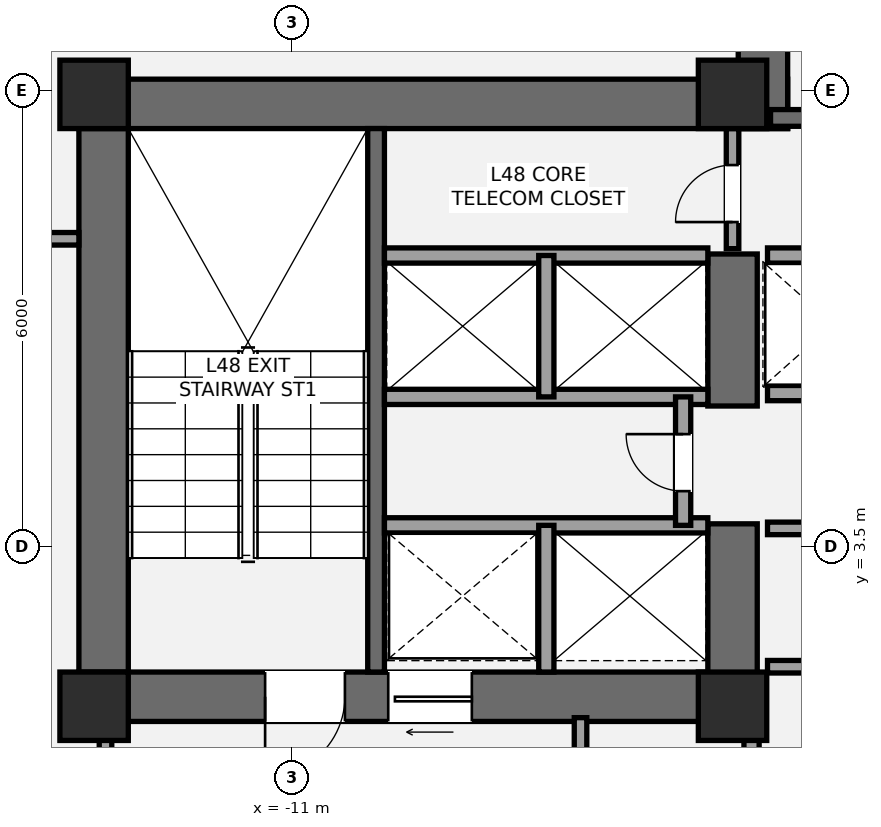
"""IFC4 building model, lengths in metres.
Left out: names, types, materials, properties, quantities, classifications, styles, units other than length and angle.
Written with IfcOpenShell. Run it as: python <this file> out.ifc"""

import sys

from ifc_helpers import new_model, si_unit, direction, frame, frame_2d, origin, origin_2d, place, context, subcontext, project, spatial, rectangle, extrude, element, fill, save


model = new_model("IFC4")
c1 = context("Model", 3, precision=1e-05, world=origin(), true_north=direction((0.0, 1.0)))
c2 = subcontext(c1, "Body", "Model", "MODEL_VIEW")
j1 = project(units=[si_unit("LENGTHUNIT", "METRE"), si_unit("PLANEANGLEUNIT", "RADIAN")], contexts=[c1])
p1 = place(None, origin())
s1 = spatial("IfcSite", under=j1, at=p1, CompositionType="ELEMENT")
p2 = place(p1, origin())
s2 = spatial("IfcBuilding", under=s1, at=p2, CompositionType="ELEMENT")
p3 = place(p2, frame((0.0, 0.0, 175.8)))
s3 = spatial("IfcBuildingStorey", under=s2, at=p3, CompositionType="ELEMENT", Elevation=175.8)
p4 = place(p3, frame((-13.475, 1.2, 0.0), z_axis=(0.0, 0.0, 1.0), x_axis=(0.0, 1.0, 0.0)))
e1 = element("IfcWall", 1, at=p4, inside=s3, PredefinedType="SHEAR", context=c2, shape_type="SweptSolid", body=[
    extrude(rectangle(XDim=8.45, YDim=0.65, at=frame_2d((4.225, 0.0))), origin(), (0.0, 0.0, 1.0), 3.2),
])
p5 = place(p3, frame((-13.8, 9.325, 0.0), z_axis=(0.0, 0.0, 1.0), x_axis=(1.0, 0.0, 0.0)))
e2 = element("IfcWall", 2, at=p5, inside=s3, PredefinedType="SHEAR", context=c2, shape_type="SweptSolid", body=[
    extrude(rectangle(XDim=9.325, YDim=0.65, at=frame_2d((4.663, 0.0))), origin(), (0.0, 0.0, 1.0), 3.2),
])
p6 = place(p3, frame((-4.875, 1.525, 0.0), z_axis=(0.0, 0.0, 1.0), x_axis=(-1.0, 0.0, 0.0)))
e3 = element("IfcWall", 3, at=p6, inside=s3, PredefinedType="SHEAR", context=c2, shape_type="SweptSolid", body=[
    extrude(rectangle(XDim=8.925, YDim=0.65, at=frame_2d((4.462, 0.0))), origin(), (0.0, 0.0, 1.0), 3.2),
])
p7 = place(p6, frame((5.425, 0.0, 0.0)))
e4 = element("IfcOpeningElement", 4, at=p7, cuts=e3, PredefinedType="OPENING", context=c2, shape_type="SweptSolid", body=[
    extrude(rectangle(XDim=1.05, YDim=2.15, at=frame_2d((0.525, 1.075))), frame((0.0, 0.335, 0.0), z_axis=(0.0, -1.0, 0.0), x_axis=(1.0, 0.0, 0.0)), (0.0, 0.0, 1.0), 0.67),
])
p8 = place(p6, frame((3.755, 0.0, 0.0)))
e5 = element("IfcOpeningElement", 5, at=p8, cuts=e3, PredefinedType="OPENING", context=c2, shape_type="SweptSolid", body=[
    extrude(rectangle(XDim=1.1, YDim=2.2, at=frame_2d((0.55, 1.1))), frame((0.0, 0.335, 0.0), z_axis=(0.0, -1.0, 0.0), x_axis=(1.0, 0.0, 0.0)), (0.0, 0.0, 1.0), 0.67),
])
p9 = place(p3, frame((-5.2, 1.2, 0.0), z_axis=(0.0, 0.0, 1.0), x_axis=(0.0, 1.0, 0.0)))
e6 = element("IfcWall", 6, at=p9, inside=s3, PredefinedType="SHEAR", context=c2, shape_type="SweptSolid", body=[
    extrude(rectangle(XDim=2.6, YDim=0.65, at=frame_2d((1.3, 0.0))), origin(), (0.0, 0.0, 1.0), 3.2),
])
p10 = place(p3, frame((-5.2, 5.35, 0.0), z_axis=(0.0, 0.0, 1.0), x_axis=(0.0, 1.0, 0.0)))
e7 = element("IfcWall", 7, at=p10, inside=s3, PredefinedType="SHEAR", context=c2, shape_type="SweptSolid", body=[
    extrude(rectangle(XDim=2.0, YDim=0.65, at=frame_2d((1.0, 0.0))), origin(), (0.0, 0.0, 1.0), 3.2),
])
p11 = place(p3, frame((-9.89, 1.85, 0.0), z_axis=(0.0, 0.0, 1.0), x_axis=(0.0, 1.0, 0.0)))
e8 = element("IfcWall", 8, at=p11, inside=s3, PredefinedType="SHEAR", context=c2, shape_type="SweptSolid", body=[
    extrude(rectangle(XDim=7.15, YDim=0.22, at=frame_2d((3.575, 0.0))), origin(), (0.0, 0.0, 1.0), 3.2),
])
p12 = place(p3, frame((-4.8, 9.0, 0.0), z_axis=(0.0, 0.0, 1.0), x_axis=(0.0, 1.0, 0.0)))
e9 = element("IfcWall", 9, at=p12, inside=s3, PredefinedType="SHEAR", context=c2, shape_type="SweptSolid", body=[
    extrude(rectangle(XDim=4.05, YDim=0.65, at=frame_2d((2.025, 0.0))), origin(), (0.0, 0.0, 1.0), 3.2),
])
p13 = place(p3, frame((-4.7, 9.14, 0.0), z_axis=(0.0, 0.0, 1.0), x_axis=(1.0, 0.0, 0.0)))
e10 = element("IfcWall", 10, at=p13, inside=s3, PredefinedType="SHEAR", context=c2, shape_type="SweptSolid", body=[
    extrude(rectangle(XDim=9.3, YDim=0.22, at=frame_2d((4.65, 0.0))), origin(), (0.0, 0.0, 1.0), 3.2),
])
p14 = place(p13, frame((1.15, 0.0, 0.0)))
e11 = element("IfcOpeningElement", 11, at=p14, cuts=e10, PredefinedType="OPENING", context=c2, shape_type="SweptSolid", body=[
    extrude(rectangle(XDim=1.05, YDim=2.15, at=frame_2d((0.525, 1.075))), frame((0.0, 0.12, 0.0), z_axis=(0.0, -1.0, 0.0), x_axis=(1.0, 0.0, 0.0)), (0.0, 0.0, 1.0), 0.24),
])
for number, where, z_axis, x_axis in (
    (12, (-13.6, 1.4, 0.0), (0.0, 0.0, 1.0), (1.0, 0.0, 0.0)),
    (13, (-13.6, 9.45, 0.0), (0.0, 0.0, 1.0), (1.0, 0.0, 0.0)),
    (14, (-5.2, 1.4, 0.0), (0.0, 0.0, 1.0), (1.0, 0.0, 0.0)),
    (15, (-5.2, 9.45, 0.0), (0.0, 0.0, 1.0), (1.0, 0.0, 0.0)),
):
    element("IfcColumn", number, at=place(p3, frame(where, z_axis=z_axis, x_axis=x_axis)), inside=s3, PredefinedType="COLUMN", context=c2, shape_type="SweptSolid", body=[
        extrude(rectangle(XDim=0.9, YDim=0.9, at=origin_2d()), origin(), (0.0, 0.0, 1.0), 3.2),
    ])
p15 = place(p3, frame((-13.45, -2.15, 0.0), z_axis=(0.0, 0.0, 1.0), x_axis=(0.0, 1.0, 0.0)))
e16 = element("IfcWall", 16, at=p15, inside=s3, PredefinedType="PARTITIONING", context=c2, shape_type="SweptSolid", body=[
    extrude(rectangle(XDim=3.4, YDim=0.165, at=frame_2d((1.7, 0.0))), origin(), (0.0, 0.0, 1.0), 2.473),
])
p16 = place(p15, frame((1.15, 0.0, 0.0)))
e17 = element("IfcOpeningElement", 17, at=p16, cuts=e16, PredefinedType="OPENING", context=c2, shape_type="SweptSolid", body=[
    extrude(rectangle(XDim=1.05, YDim=2.15, at=frame_2d((0.525, 1.075))), frame((0.0, 0.093, 0.0), z_axis=(0.0, -1.0, 0.0), x_axis=(1.0, 0.0, 0.0)), (0.0, 0.0, 1.0), 0.185),
])
p17 = place(p3, frame((-7.2, -2.15, 0.0), z_axis=(0.0, 0.0, 1.0), x_axis=(0.0, 1.0, 0.0)))
e18 = element("IfcWall", 18, at=p17, inside=s3, PredefinedType="PARTITIONING", context=c2, shape_type="SweptSolid", body=[
    extrude(rectangle(XDim=3.4, YDim=0.165, at=frame_2d((1.7, 0.0))), origin(), (0.0, 0.0, 1.0), 2.473),
])
p18 = place(p3, frame((-4.95, -2.15, 0.0), z_axis=(0.0, 0.0, 1.0), x_axis=(0.0, 1.0, 0.0)))
e19 = element("IfcWall", 19, at=p18, inside=s3, PredefinedType="SOLIDWALL", context=c2, shape_type="SweptSolid", body=[
    extrude(rectangle(XDim=3.4, YDim=0.2, at=frame_2d((1.7, 0.0))), origin(), (0.0, 0.0, 1.0), 2.473),
])
p19 = place(p18, frame((0.95, 0.0, 0.0)))
e20 = element("IfcOpeningElement", 20, at=p19, cuts=e19, PredefinedType="OPENING", context=c2, shape_type="SweptSolid", body=[
    extrude(rectangle(XDim=0.75, YDim=2.1, at=frame_2d((0.375, 1.05))), frame((0.0, 0.11, 0.0), z_axis=(0.0, -1.0, 0.0), x_axis=(1.0, 0.0, 0.0)), (0.0, 0.0, 1.0), 0.22),
])
p20 = place(p3, frame((-9.78, 3.78, 0.0), z_axis=(0.0, 0.0, 1.0), x_axis=(1.0, 0.0, 0.0)))
e21 = element("IfcWall", 21, at=p20, inside=s3, PredefinedType="SOLIDWALL", context=c2, shape_type="SweptSolid", body=[
    extrude(rectangle(XDim=4.255, YDim=0.2, at=frame_2d((2.127, 0.0))), origin(), (0.0, 0.0, 1.0), 3.02),
])
p21 = place(p3, frame((-7.65, 1.85, 0.0), z_axis=(0.0, 0.0, 1.0), x_axis=(0.0, 1.0, 0.0)))
e22 = element("IfcWall", 22, at=p21, inside=s3, PredefinedType="SOLIDWALL", context=c2, shape_type="SweptSolid", body=[
    extrude(rectangle(XDim=1.93, YDim=0.2, at=frame_2d((0.965, 0.0))), origin(), (0.0, 0.0, 1.0), 3.02),
])
for number, where, z_axis, x_axis in (
    (23, (-9.78, 5.47, 0.0), (0.0, 0.0, 1.0), (1.0, 0.0, 0.0)),
    (24, (-9.78, 7.33, 0.0), (0.0, 0.0, 1.0), (1.0, 0.0, 0.0)),
):
    element("IfcWall", number, at=place(p3, frame(where, z_axis=z_axis, x_axis=x_axis)), inside=s3, PredefinedType="SOLIDWALL", context=c2, shape_type="SweptSolid", body=[
        extrude(rectangle(XDim=4.255, YDim=0.2, at=frame_2d((2.127, 0.0))), origin(), (0.0, 0.0, 1.0), 3.02),
    ])
p22 = place(p3, frame((-7.65, 5.47, 0.0), z_axis=(0.0, 0.0, 1.0), x_axis=(0.0, 1.0, 0.0)))
e25 = element("IfcWall", 25, at=p22, inside=s3, PredefinedType="SOLIDWALL", context=c2, shape_type="SweptSolid", body=[
    extrude(rectangle(XDim=1.86, YDim=0.2, at=frame_2d((0.93, 0.0))), origin(), (0.0, 0.0, 1.0), 3.02),
])
p23 = place(p3, frame((-5.85, 3.78, 0.0), z_axis=(0.0, 0.0, 1.0), x_axis=(0.0, 1.0, 0.0)))
e26 = element("IfcWall", 26, at=p23, inside=s3, PredefinedType="SOLIDWALL", context=c2, shape_type="SweptSolid", body=[
    extrude(rectangle(XDim=1.69, YDim=0.2, at=frame_2d((0.845, 0.0))), origin(), (0.0, 0.0, 1.0), 3.02),
])
p24 = place(p23, frame((0.45, 0.0, 0.0)))
e27 = element("IfcOpeningElement", 27, at=p24, cuts=e26, PredefinedType="OPENING", context=c2, shape_type="SweptSolid", body=[
    extrude(rectangle(XDim=0.75, YDim=2.1, at=frame_2d((0.375, 1.05))), frame((0.0, 0.11, 0.0), z_axis=(0.0, -1.0, 0.0), x_axis=(1.0, 0.0, 0.0)), (0.0, 0.0, 1.0), 0.22),
])
p25 = place(p3, frame((-4.74, 1.92, 0.0), z_axis=(0.0, 0.0, 1.0), x_axis=(1.0, 0.0, 0.0)))
e28 = element("IfcWall", 28, at=p25, inside=s3, PredefinedType="PARTITIONING", context=c2, shape_type="SweptSolid", body=[
    extrude(rectangle(XDim=3.89, YDim=0.165, at=frame_2d((1.945, 0.0))), origin(), (0.0, 0.0, 1.0), 2.16),
])
p26 = place(p3, frame((-4.74, 3.74, 0.0), z_axis=(0.0, 0.0, 1.0), x_axis=(1.0, 0.0, 0.0)))
e29 = element("IfcWall", 29, at=p26, inside=s3, PredefinedType="PARTITIONING", context=c2, shape_type="SweptSolid", body=[
    extrude(rectangle(XDim=3.89, YDim=0.165, at=frame_2d((1.945, 0.0))), origin(), (0.0, 0.0, 1.0), 3.02),
])
p27 = place(p26, frame((1.6, 0.0, 0.0)))
e30 = element("IfcOpeningElement", 30, at=p27, cuts=e29, PredefinedType="OPENING", context=c2, shape_type="SweptSolid", body=[
    extrude(rectangle(XDim=0.85, YDim=2.1, at=frame_2d((0.425, 1.05))), frame((0.0, 0.093, 0.0), z_axis=(0.0, -1.0, 0.0), x_axis=(1.0, 0.0, 0.0)), (0.0, 0.0, 1.0), 0.185),
])
p28 = place(p3, frame((-4.74, 5.52, 0.0), z_axis=(0.0, 0.0, 1.0), x_axis=(1.0, 0.0, 0.0)))
e31 = element("IfcWall", 31, at=p28, inside=s3, PredefinedType="SOLIDWALL", context=c2, shape_type="SweptSolid", body=[
    extrude(rectangle(XDim=3.86, YDim=0.2, at=frame_2d((1.93, 0.0))), origin(), (0.0, 0.0, 1.0), 3.02),
])
p29 = place(p28, frame((0.55, 0.0, 0.0)))
e32 = element("IfcOpeningElement", 32, at=p29, cuts=e31, PredefinedType="OPENING", context=c2, shape_type="SweptSolid", body=[
    extrude(rectangle(XDim=1.1, YDim=2.2, at=frame_2d((0.55, 1.1))), frame((0.0, 0.11, 0.0), z_axis=(0.0, -1.0, 0.0), x_axis=(1.0, 0.0, 0.0)), (0.0, 0.0, 1.0), 0.22),
])
p30 = place(p28, frame((2.3, 0.0, 0.0)))
e33 = element("IfcOpeningElement", 33, at=p30, cuts=e31, PredefinedType="OPENING", context=c2, shape_type="SweptSolid", body=[
    extrude(rectangle(XDim=1.1, YDim=2.2, at=frame_2d((0.55, 1.1))), frame((0.0, 0.11, 0.0), z_axis=(0.0, -1.0, 0.0), x_axis=(1.0, 0.0, 0.0)), (0.0, 0.0, 1.0), 0.22),
])
p31 = place(p3, frame((-4.74, 7.33, 0.0), z_axis=(0.0, 0.0, 1.0), x_axis=(1.0, 0.0, 0.0)))
e34 = element("IfcWall", 34, at=p31, inside=s3, PredefinedType="SOLIDWALL", context=c2, shape_type="SweptSolid", body=[
    extrude(rectangle(XDim=3.86, YDim=0.2, at=frame_2d((1.93, 0.0))), origin(), (0.0, 0.0, 1.0), 3.02),
])
p32 = place(p3, frame((-5.2, 7.42, 0.0), z_axis=(0.0, 0.0, 1.0), x_axis=(0.0, 1.0, 0.0)))
e35 = element("IfcWall", 35, at=p32, inside=s3, PredefinedType="PARTITIONING", context=c2, shape_type="SweptSolid", body=[
    extrude(rectangle(XDim=1.58, YDim=0.165, at=frame_2d((0.79, 0.0))), origin(), (0.0, 0.0, 1.0), 3.02),
])
p33 = place(p32, frame((0.35, 0.0, 0.0)))
e36 = element("IfcOpeningElement", 36, at=p33, cuts=e35, PredefinedType="OPENING", context=c2, shape_type="SweptSolid", body=[
    extrude(rectangle(XDim=0.75, YDim=2.1, at=frame_2d((0.375, 1.05))), frame((0.0, 0.093, 0.0), z_axis=(0.0, -1.0, 0.0), x_axis=(1.0, 0.0, 0.0)), (0.0, 0.0, 1.0), 0.185),
])
p34 = place(p3, frame((-15.55, 7.55, 0.0), z_axis=(0.0, 0.0, 1.0), x_axis=(1.0, 0.0, 0.0)))
e37 = element("IfcWall", 37, at=p34, inside=s3, PredefinedType="PARTITIONING", context=c2, shape_type="SweptSolid", body=[
    extrude(rectangle(XDim=1.75, YDim=0.165, at=frame_2d((0.875, 0.0))), origin(), (0.0, 0.0, 1.0), 3.02),
])
p35 = place(p7, origin())
e38 = element("IfcDoor", 38, at=p35, inside=s3, OperationType="SINGLE_SWING_RIGHT", PredefinedType="DOOR", context=c2, shape_type="SweptSolid", body=[
    extrude(rectangle(XDim=1.05, YDim=2.15, at=frame_2d((0.525, 1.075))), frame((0.0, 0.025, 0.0), z_axis=(0.0, -1.0, 0.0), x_axis=(1.0, 0.0, 0.0)), (0.0, 0.0, 1.0), 0.05),
])
fill(e4, e38)
p36 = place(p8, origin())
e39 = element("IfcDoor", 39, at=p36, inside=s3, OperationType="SLIDING_TO_LEFT", PredefinedType="DOOR", context=c2, shape_type="SweptSolid", body=[
    extrude(rectangle(XDim=1.1, YDim=2.2, at=frame_2d((0.55, 1.1))), frame((0.0, 0.025, 0.0), z_axis=(0.0, -1.0, 0.0), x_axis=(1.0, 0.0, 0.0)), (0.0, 0.0, 1.0), 0.05),
])
fill(e5, e39)
p37 = place(p24, origin())
e40 = element("IfcDoor", 40, at=p37, inside=s3, OperationType="SINGLE_SWING_RIGHT", PredefinedType="DOOR", context=c2, shape_type="SweptSolid", body=[
    extrude(rectangle(XDim=0.75, YDim=2.1, at=frame_2d((0.375, 1.05))), frame((0.0, 0.025, 0.0), z_axis=(0.0, -1.0, 0.0), x_axis=(1.0, 0.0, 0.0)), (0.0, 0.0, 1.0), 0.05),
])
fill(e27, e40)
p38 = place(p33, origin())
e41 = element("IfcDoor", 41, at=p38, inside=s3, OperationType="SINGLE_SWING_LEFT", PredefinedType="DOOR", context=c2, shape_type="SweptSolid", body=[
    extrude(rectangle(XDim=0.75, YDim=2.1, at=frame_2d((0.375, 1.05))), frame((0.0, 0.025, 0.0), z_axis=(0.0, -1.0, 0.0), x_axis=(1.0, 0.0, 0.0)), (0.0, 0.0, 1.0), 0.05),
])
fill(e36, e41)
save(model, sys.argv[1])
